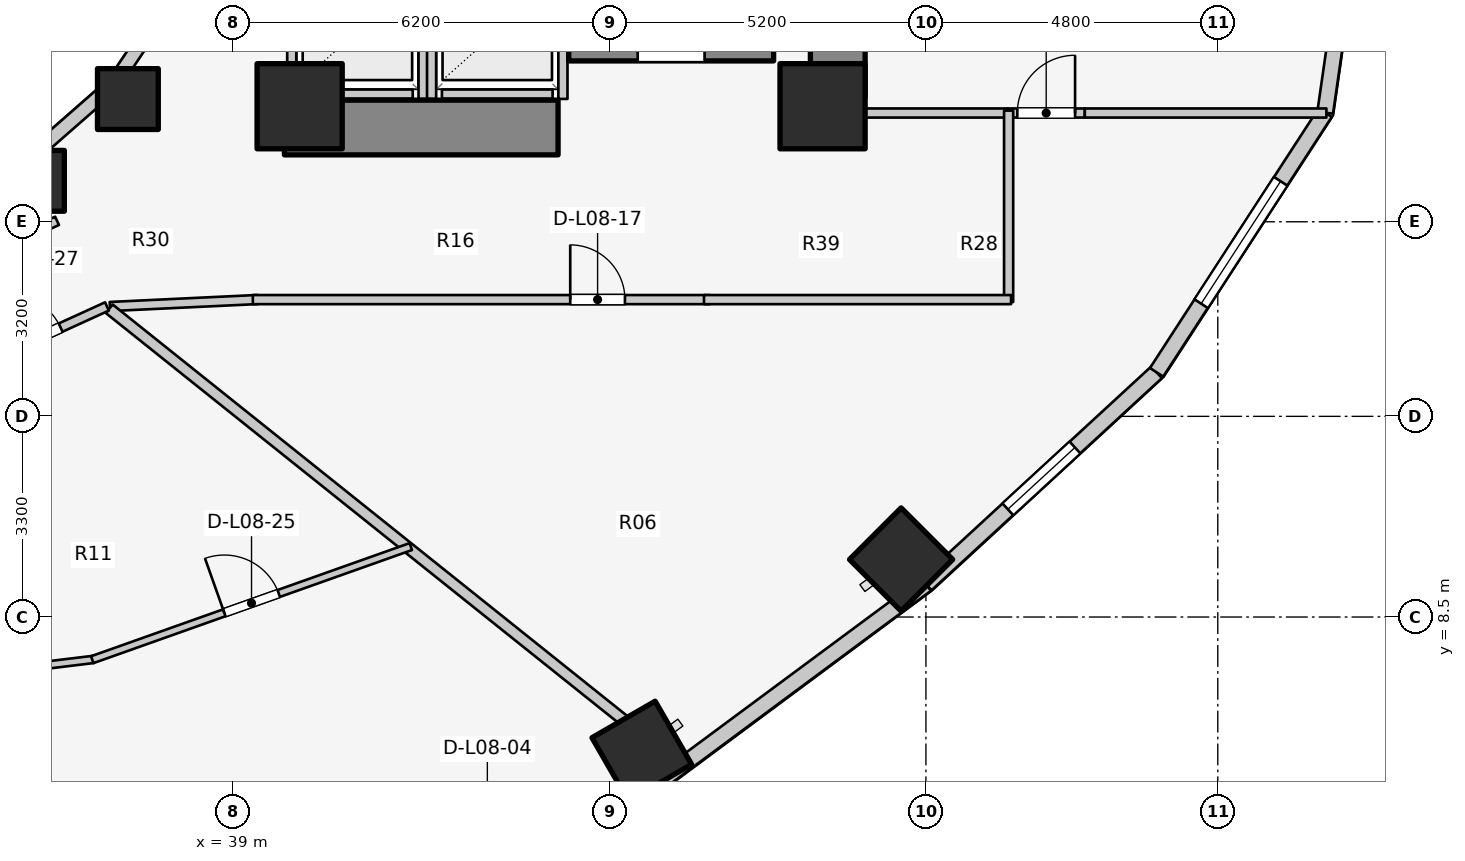
"""IFC4 building model, lengths in metres.
Left out: names, types, materials, properties, quantities, classifications, styles, units other than length and angle.
Written with IfcOpenShell. Run it as: python <this file> out.ifc"""

import sys

from ifc_helpers import new_model, si_unit, direction, frame, frame_2d, origin, origin_2d, place, context, subcontext, project, spatial, rectangle, extrude, element, fill, save


model = new_model("IFC4")
c1 = context("Model", 3, precision=1e-05, world=origin(), true_north=direction((0.0, 1.0)))
c2 = subcontext(c1, "Body", "Model", "MODEL_VIEW")
j1 = project(units=[si_unit("LENGTHUNIT", "METRE"), si_unit("PLANEANGLEUNIT", "RADIAN")], contexts=[c1])
p1 = place(None, origin())
s1 = spatial("IfcSite", under=j1, at=p1, CompositionType="ELEMENT")
p2 = place(p1, origin())
s2 = spatial("IfcBuilding", under=s1, at=p2, CompositionType="ELEMENT")
p3 = place(p2, frame((0.0, 0.0, 30.7)))
s3 = spatial("IfcBuildingStorey", under=s2, at=p3, CompositionType="ELEMENT", Elevation=30.7)
p4 = place(p3, frame((48.95, 17.05, 0.0), z_axis=(0.0, 0.0, 1.0), x_axis=(0.0, 1.0, 0.0)))
e1 = element("IfcWall", 1, at=p4, inside=s3, PredefinedType="SHEAR", context=c2, shape_type="SweptSolid", body=[
    extrude(rectangle(XDim=12.8, YDim=0.9, at=frame_2d((6.4, 0.0))), origin(), (0.0, 0.0, 1.0), 3.1),
])
p5 = place(p3, frame((39.85, 16.55, 0.0), z_axis=(0.0, 0.0, 1.0), x_axis=(1.0, 0.0, 0.0)))
e2 = element("IfcWall", 2, at=p5, inside=s3, PredefinedType="SHEAR", context=c2, shape_type="SweptSolid", body=[
    extrude(rectangle(XDim=4.5, YDim=0.9, at=frame_2d((2.25, 0.0))), origin(), (0.0, 0.0, 1.0), 3.1),
])
p6 = place(p3, frame((44.525, 17.77, 0.0), z_axis=(0.0, 0.0, 1.0), x_axis=(1.0, 0.0, 0.0)))
e3 = element("IfcWall", 3, at=p6, inside=s3, PredefinedType="SOLIDWALL", context=c2, shape_type="SweptSolid", body=[
    extrude(rectangle(XDim=3.37, YDim=0.25, at=frame_2d((1.685, 0.0))), origin(), (0.0, 0.0, 1.0), 3.1),
])
p7 = place(p6, frame((1.135, 0.0, 0.0)))
e4 = element("IfcOpeningElement", 4, at=p7, cuts=e3, PredefinedType="OPENING", context=c2, shape_type="SweptSolid", body=[
    extrude(rectangle(XDim=1.1, YDim=2.1, at=frame_2d((0.55, 1.05))), frame((0.0, 0.135, 0.0), z_axis=(0.0, -1.0, 0.0), x_axis=(1.0, 0.0, 0.0)), (0.0, 0.0, 1.0), 0.27),
])
for number, where, z_axis, x_axis in (
    (5, (40.1, 16.9, 0.0), (0.0, 0.0, 1.0), (1.0, 0.0, 0.0)),
    (6, (48.7, 16.9, 0.0), (0.0, 0.0, 1.0), (1.0, 0.0, 0.0)),
):
    element("IfcColumn", number, at=place(p3, frame(where, z_axis=z_axis, x_axis=x_axis)), inside=s3, PredefinedType="COLUMN", context=c2, shape_type="SweptSolid", body=[
        extrude(rectangle(XDim=1.4, YDim=1.4, at=origin_2d()), origin(), (0.0, 0.0, 1.0), 3.1),
    ])
p8 = place(p3, frame((35.73, 15.673, 0.0), z_axis=(0.0, 0.0, 1.0), x_axis=(1.0, 0.0, 0.0)))
e7 = element("IfcColumn", 7, at=p8, inside=s3, PredefinedType="COLUMN", context=c2, shape_type="SweptSolid", body=[
    extrude(rectangle(XDim=1.0, YDim=1.0, at=origin_2d()), origin(), (0.0, 0.0, 1.0), 3.1),
])
p9 = place(p3, frame((45.727, 6.296, 0.0), z_axis=(0.0, 0.0, 1.0), x_axis=(0.5, -0.866025403784, 0.0)))
e8 = element("IfcColumn", 8, at=p9, inside=s3, PredefinedType="COLUMN", context=c2, shape_type="SweptSolid", body=[
    extrude(rectangle(XDim=1.2, YDim=1.2, at=origin_2d()), origin(), (0.0, 0.0, 1.0), 3.1),
])
p10 = place(p3, frame((37.275, 17.018, 0.0), z_axis=(0.0, 0.0, 1.0), x_axis=(1.0, 0.0, 0.0)))
e9 = element("IfcColumn", 9, at=p10, inside=s3, PredefinedType="COLUMN", context=c2, shape_type="SweptSolid", body=[
    extrude(rectangle(XDim=1.0, YDim=1.0, at=origin_2d()), origin(), (0.0, 0.0, 1.0), 3.1),
])
p11 = place(p3, frame((49.992, 9.446, 0.0), z_axis=(0.0, 0.0, 1.0), x_axis=(0.707106781187, -0.707106781187, 0.0)))
e10 = element("IfcColumn", 10, at=p11, inside=s3, PredefinedType="COLUMN", context=c2, shape_type="SweptSolid", body=[
    extrude(rectangle(XDim=1.2, YDim=1.2, at=origin_2d()), origin(), (0.0, 0.0, 1.0), 3.1),
])
p12 = place(p3, frame((35.56, 15.968, 0.0), z_axis=(0.0, 0.0, 1.0), x_axis=(0.752576694707, 0.658504607869, 0.0)))
e11 = element("IfcWall", 11, at=p12, inside=s3, PredefinedType="STANDARD", context=c2, shape_type="SweptSolid", body=[
    extrude(rectangle(XDim=1.959, YDim=0.23, at=frame_2d((0.98, 0.0))), origin(), (0.0, 0.0, 1.0), 2.16),
])
p13 = place(p3, frame((37.035, 17.258, 0.0), z_axis=(0.0, 0.0, 1.0), x_axis=(0.558197800898, 0.829707909492, 0.0)))
e12 = element("IfcWall", 12, at=p13, inside=s3, PredefinedType="STANDARD", context=c2, shape_type="SweptSolid", body=[
    extrude(rectangle(XDim=2.027, YDim=0.23, at=frame_2d((1.013, 0.0))), origin(), (0.0, 0.0, 1.0), 2.16),
])
p14 = place(p3, frame((40.332, 3.364, 0.0), z_axis=(0.0, 0.0, 1.0), x_axis=(0.919612132394, 0.39282760335, 0.0)))
e13 = element("IfcWall", 13, at=p14, inside=s3, PredefinedType="STANDARD", context=c2, shape_type="SweptSolid", body=[
    extrude(rectangle(XDim=6.209, YDim=0.26, at=frame_2d((3.105, 0.0))), origin(), (0.0, 0.0, 1.0), 2.88),
])
p15 = place(p14, frame((2.505, 0.0, 0.0)))
e14 = element("IfcOpeningElement", 14, at=p15, cuts=e13, PredefinedType="OPENING", context=c2, shape_type="SweptSolid", body=[
    extrude(rectangle(XDim=1.2, YDim=2.2, at=frame_2d((0.6, 1.1))), frame((0.0, 0.14, 0.0), z_axis=(0.0, -1.0, 0.0), x_axis=(1.0, 0.0, 0.0)), (0.0, 0.0, 1.0), 0.28),
])
p16 = place(p3, frame((46.042, 5.803, 0.0), z_axis=(0.0, 0.0, 1.0), x_axis=(0.803477531792, 0.595335078679, 0.0)))
e15 = element("IfcWall", 15, at=p16, inside=s3, PredefinedType="STANDARD", context=c2, shape_type="SweptSolid", body=[
    extrude(rectangle(XDim=5.43, YDim=0.26, at=frame_2d((2.715, 0.0))), origin(), (0.0, 0.0, 1.0), 2.85),
])
p17 = place(p3, frame((50.405, 9.035, 0.0), z_axis=(0.0, 0.0, 1.0), x_axis=(0.735655109293, 0.67735630223, 0.0)))
e16 = element("IfcWall", 16, at=p17, inside=s3, PredefinedType="STANDARD", context=c2, shape_type="SweptSolid", body=[
    extrude(rectangle(XDim=5.151, YDim=0.26, at=frame_2d((2.575, 0.0))), origin(), (0.0, 0.0, 1.0), 2.85),
])
p18 = place(p17, frame((1.825, 0.0, 0.75)))
e17 = element("IfcOpeningElement", 17, at=p18, cuts=e16, PredefinedType="OPENING", context=c2, shape_type="SweptSolid", body=[
    extrude(rectangle(XDim=1.5, YDim=1.6, at=frame_2d((0.75, 0.8))), frame((0.0, 0.14, 0.0), z_axis=(0.0, -1.0, 0.0), x_axis=(1.0, 0.0, 0.0)), (0.0, 0.0, 1.0), 0.28),
])
p19 = place(p3, frame((54.194, 12.524, 0.0), z_axis=(0.0, 0.0, 1.0), x_axis=(0.544578722263, 0.838709732421, 0.0)))
e18 = element("IfcWall", 18, at=p19, inside=s3, PredefinedType="STANDARD", context=c2, shape_type="SweptSolid", body=[
    extrude(rectangle(XDim=5.092, YDim=0.26, at=frame_2d((2.546, 0.0))), origin(), (0.0, 0.0, 1.0), 2.85),
])
p20 = place(p19, frame((1.346, 0.0, 0.75)))
e19 = element("IfcOpeningElement", 19, at=p20, cuts=e18, PredefinedType="OPENING", context=c2, shape_type="SweptSolid", body=[
    extrude(rectangle(XDim=2.4, YDim=1.7, at=frame_2d((1.2, 0.85))), frame((0.0, 0.14, 0.0), z_axis=(0.0, -1.0, 0.0), x_axis=(1.0, 0.0, 0.0)), (0.0, 0.0, 1.0), 0.28),
])
p21 = place(p3, frame((56.967, 16.795, 0.0), z_axis=(0.0, 0.0, 1.0), x_axis=(0.142528001686, 0.989790770181, 0.0)))
e20 = element("IfcWall", 20, at=p21, inside=s3, PredefinedType="STANDARD", context=c2, shape_type="SweptSolid", body=[
    extrude(rectangle(XDim=6.269, YDim=0.26, at=frame_2d((3.135, 0.0))), origin(), (0.0, 0.0, 1.0), 2.85),
])
p22 = place(p21, frame((2.385, 0.0, 0.75)))
e21 = element("IfcOpeningElement", 21, at=p22, cuts=e20, PredefinedType="OPENING", context=c2, shape_type="SweptSolid", body=[
    extrude(rectangle(XDim=1.5, YDim=1.6, at=frame_2d((0.75, 0.8))), frame((0.0, 0.14, 0.0), z_axis=(0.0, -1.0, 0.0), x_axis=(1.0, 0.0, 0.0)), (0.0, 0.0, 1.0), 0.28),
])
p23 = place(p3, frame((40.14, 17.1, 0.0), z_axis=(0.0, 0.0, 1.0), x_axis=(1.0, 0.0, 0.0)))
e22 = element("IfcWall", 22, at=p23, inside=s3, PredefinedType="SOLIDWALL", context=c2, shape_type="SweptSolid", body=[
    extrude(rectangle(XDim=1.82, YDim=0.15, at=frame_2d((0.91, 0.0))), origin(), (0.0, 0.0, 1.0), 2.12),
])
p24 = place(p3, frame((39.97, 17.02, 0.0), z_axis=(0.0, 0.0, 1.0), x_axis=(0.0, 1.0, 0.0)))
e23 = element("IfcWall", 23, at=p24, inside=s3, PredefinedType="SOLIDWALL", context=c2, shape_type="SweptSolid", body=[
    extrude(rectangle(XDim=2.22, YDim=0.15, at=frame_2d((1.11, 0.0))), origin(), (0.0, 0.0, 1.0), 2.12),
])
p25 = place(p3, frame((42.13, 17.02, 0.0), z_axis=(0.0, 0.0, 1.0), x_axis=(0.0, 1.0, 0.0)))
e24 = element("IfcWall", 24, at=p25, inside=s3, PredefinedType="SOLIDWALL", context=c2, shape_type="SweptSolid", body=[
    extrude(rectangle(XDim=2.22, YDim=0.15, at=frame_2d((1.11, 0.0))), origin(), (0.0, 0.0, 1.0), 2.855),
])
p26 = place(p3, frame((42.44, 17.1, 0.0), z_axis=(0.0, 0.0, 1.0), x_axis=(1.0, 0.0, 0.0)))
e25 = element("IfcWall", 25, at=p26, inside=s3, PredefinedType="SOLIDWALL", context=c2, shape_type="SweptSolid", body=[
    extrude(rectangle(XDim=1.82, YDim=0.15, at=frame_2d((0.91, 0.0))), origin(), (0.0, 0.0, 1.0), 2.855),
])
p27 = place(p3, frame((42.27, 17.02, 0.0), z_axis=(0.0, 0.0, 1.0), x_axis=(0.0, 1.0, 0.0)))
e26 = element("IfcWall", 26, at=p27, inside=s3, PredefinedType="SOLIDWALL", context=c2, shape_type="SweptSolid", body=[
    extrude(rectangle(XDim=2.22, YDim=0.15, at=frame_2d((1.11, 0.0))), origin(), (0.0, 0.0, 1.0), 2.855),
])
p28 = place(p3, frame((44.43, 17.02, 0.0), z_axis=(0.0, 0.0, 1.0), x_axis=(0.0, 1.0, 0.0)))
e27 = element("IfcWall", 27, at=p28, inside=s3, PredefinedType="SOLIDWALL", context=c2, shape_type="SweptSolid", body=[
    extrude(rectangle(XDim=2.22, YDim=0.15, at=frame_2d((1.11, 0.0))), origin(), (0.0, 0.0, 1.0), 2.12),
])
p29 = place(p3, frame((34.127, 14.094, 0.0), z_axis=(0.0, 0.0, 1.0), x_axis=(0.906943449489, 0.421252393975, 0.0)))
e28 = element("IfcWall", 28, at=p29, inside=s3, PredefinedType="PARTITIONING", context=c2, shape_type="SweptSolid", body=[
    extrude(rectangle(XDim=2.186, YDim=0.15, at=frame_2d((1.093, 0.0))), origin(), (0.0, 0.0, 1.0), 2.237),
])
p30 = place(p3, frame((48.95, 16.788, 0.0), z_axis=(0.0, 0.0, 1.0), x_axis=(1.0, 0.0, 0.0)))
e29 = element("IfcWall", 29, at=p30, inside=s3, PredefinedType="PARTITIONING", context=c2, shape_type="SweptSolid", body=[
    extrude(rectangle(XDim=2.793, YDim=0.15, at=frame_2d((1.396, 0.0))), origin(), (0.0, 0.0, 1.0), 2.069),
])
p31 = place(p3, frame((51.743, 16.788, 0.0), z_axis=(0.0, 0.0, 1.0), x_axis=(1.0, 0.0, 0.0)))
e30 = element("IfcWall", 30, at=p31, inside=s3, PredefinedType="PARTITIONING", context=c2, shape_type="SweptSolid", body=[
    extrude(rectangle(XDim=1.27, YDim=0.15, at=frame_2d((0.635, 0.0))), origin(), (0.0, 0.0, 1.0), 2.855),
])
p32 = place(p31, frame((0.16, 0.0, 0.0)))
e31 = element("IfcOpeningElement", 31, at=p32, cuts=e30, PredefinedType="OPENING", context=c2, shape_type="SweptSolid", body=[
    extrude(rectangle(XDim=0.95, YDim=2.1, at=frame_2d((0.475, 1.05))), frame((0.0, 0.085, 0.0), z_axis=(0.0, -1.0, 0.0), x_axis=(1.0, 0.0, 0.0)), (0.0, 0.0, 1.0), 0.17),
])
p33 = place(p3, frame((53.013, 16.788, 0.0), z_axis=(0.0, 0.0, 1.0), x_axis=(1.0, 0.0, 0.0)))
e32 = element("IfcWall", 32, at=p33, inside=s3, PredefinedType="PARTITIONING", context=c2, shape_type="SweptSolid", body=[
    extrude(rectangle(XDim=3.973, YDim=0.15, at=frame_2d((1.987, 0.0))), origin(), (0.0, 0.0, 1.0), 2.855),
])
p34 = place(p3, frame((51.76, 13.68, 0.0), z_axis=(0.0, 0.0, 1.0), x_axis=(0.0, 1.0, 0.0)))
e33 = element("IfcWall", 33, at=p34, inside=s3, PredefinedType="PARTITIONING", context=c2, shape_type="SweptSolid", body=[
    extrude(rectangle(XDim=3.148, YDim=0.15, at=frame_2d((1.574, 0.0))), origin(), (0.0, 0.0, 1.0), 2.855),
])
p35 = place(p3, frame((36.98, 13.606, 0.0), z_axis=(0.0, 0.0, 1.0), x_axis=(0.998877427952, 0.047369651964, 0.0)))
e34 = element("IfcWall", 34, at=p35, inside=s3, PredefinedType="PARTITIONING", context=c2, shape_type="SweptSolid", body=[
    extrude(rectangle(XDim=2.433, YDim=0.15, at=frame_2d((1.216, 0.0))), origin(), (0.0, 0.0, 1.0), 2.237),
])
p36 = place(p3, frame((39.33, 13.72, 0.0), z_axis=(0.0, 0.0, 1.0), x_axis=(1.0, 0.0, 0.0)))
e35 = element("IfcWall", 35, at=p36, inside=s3, PredefinedType="PARTITIONING", context=c2, shape_type="SweptSolid", body=[
    extrude(rectangle(XDim=7.52, YDim=0.15, at=frame_2d((3.76, 0.0))), origin(), (0.0, 0.0, 1.0), 2.237),
])
p37 = place(p36, frame((5.22, 0.0, 0.0)))
e36 = element("IfcOpeningElement", 36, at=p37, cuts=e35, PredefinedType="OPENING", context=c2, shape_type="SweptSolid", body=[
    extrude(rectangle(XDim=0.9, YDim=2.1, at=frame_2d((0.45, 1.05))), frame((0.0, 0.085, 0.0), z_axis=(0.0, -1.0, 0.0), x_axis=(1.0, 0.0, 0.0)), (0.0, 0.0, 1.0), 0.17),
])
p38 = place(p3, frame((46.75, 13.72, 0.0), z_axis=(0.0, 0.0, 1.0), x_axis=(1.0, 0.0, 0.0)))
e37 = element("IfcWall", 37, at=p38, inside=s3, PredefinedType="PARTITIONING", context=c2, shape_type="SweptSolid", body=[
    extrude(rectangle(XDim=5.05, YDim=0.15, at=frame_2d((2.525, 0.0))), origin(), (0.0, 0.0, 1.0), 2.069),
])
p39 = place(p3, frame((36.968, 13.569, 0.0), z_axis=(0.0, 0.0, 1.0), x_axis=(0.781055486744, -0.624461629428, 0.0)))
e38 = element("IfcWall", 38, at=p39, inside=s3, PredefinedType="PARTITIONING", context=c2, shape_type="SweptSolid", body=[
    extrude(rectangle(XDim=10.843, YDim=0.18, at=frame_2d((5.422, 0.0))), origin(), (0.0, 0.0, 1.0), 2.237),
])
p40 = place(p3, frame((31.95, 7.225, 0.0), z_axis=(0.0, 0.0, 1.0), x_axis=(0.992699076447, 0.120617343785, 0.0)))
e39 = element("IfcWall", 39, at=p40, inside=s3, PredefinedType="MOVABLE", context=c2, shape_type="SweptSolid", body=[
    extrude(rectangle(XDim=4.793, YDim=0.12, at=frame_2d((2.396, 0.0))), origin(), (0.0, 0.0, 1.0), 2.237),
])
p41 = place(p3, frame((36.689, 7.798, 0.0), z_axis=(0.0, 0.0, 1.0), x_axis=(0.942369240096, 0.334574678243, 0.0)))
e40 = element("IfcWall", 40, at=p41, inside=s3, PredefinedType="MOVABLE", context=c2, shape_type="SweptSolid", body=[
    extrude(rectangle(XDim=5.559, YDim=0.12, at=frame_2d((2.779, 0.0))), origin(), (0.0, 0.0, 1.0), 2.237),
])
p42 = place(p41, frame((2.304, 0.0, 0.0)))
e41 = element("IfcOpeningElement", 41, at=p42, cuts=e40, PredefinedType="OPENING", context=c2, shape_type="SweptSolid", body=[
    extrude(rectangle(XDim=0.95, YDim=2.1, at=frame_2d((0.475, 1.05))), frame((0.0, 0.07, 0.0), z_axis=(0.0, -1.0, 0.0), x_axis=(1.0, 0.0, 0.0)), (0.0, 0.0, 1.0), 0.14),
])
p43 = place(p3, frame((34.543, 12.518, 0.0), z_axis=(0.0, 0.0, 1.0), x_axis=(0.909747571199, 0.415161843982, 0.0)))
e42 = element("IfcWall", 42, at=p43, inside=s3, PredefinedType="PARTITIONING", context=c2, shape_type="SweptSolid", body=[
    extrude(rectangle(XDim=2.625, YDim=0.15, at=frame_2d((1.312, 0.0))), origin(), (0.0, 0.0, 1.0), 2.237),
])
p44 = place(p43, frame((0.838, 0.0, 0.0)))
e43 = element("IfcOpeningElement", 43, at=p44, cuts=e42, PredefinedType="OPENING", context=c2, shape_type="SweptSolid", body=[
    extrude(rectangle(XDim=0.95, YDim=2.1, at=frame_2d((0.475, 1.05))), frame((0.0, 0.085, 0.0), z_axis=(0.0, -1.0, 0.0), x_axis=(1.0, 0.0, 0.0)), (0.0, 0.0, 1.0), 0.17),
])
p45 = place(p18, origin())
e44 = element("IfcWindow", 44, at=p45, inside=s3, PartitioningType="SINGLE_PANEL", PredefinedType="WINDOW", context=c2, shape_type="SweptSolid", body=[
    extrude(rectangle(XDim=1.5, YDim=1.6, at=frame_2d((0.75, 0.8))), frame((0.0, 0.03, 0.0), z_axis=(0.0, -1.0, 0.0), x_axis=(1.0, 0.0, 0.0)), (0.0, 0.0, 1.0), 0.06),
])
fill(e17, e44)
p46 = place(p20, origin())
e45 = element("IfcWindow", 45, at=p46, inside=s3, PartitioningType="SINGLE_PANEL", PredefinedType="WINDOW", context=c2, shape_type="SweptSolid", body=[
    extrude(rectangle(XDim=2.4, YDim=1.7, at=frame_2d((1.2, 0.85))), frame((0.0, 0.03, 0.0), z_axis=(0.0, -1.0, 0.0), x_axis=(1.0, 0.0, 0.0)), (0.0, 0.0, 1.0), 0.06),
])
fill(e19, e45)
p47 = place(p7, origin())
e46 = element("IfcDoor", 46, at=p47, inside=s3, OperationType="SINGLE_SWING_LEFT", PredefinedType="DOOR", context=c2, shape_type="SweptSolid", body=[
    extrude(rectangle(XDim=1.1, YDim=2.1, at=frame_2d((0.55, 1.05))), frame((0.0, 0.025, 0.0), z_axis=(0.0, -1.0, 0.0), x_axis=(1.0, 0.0, 0.0)), (0.0, 0.0, 1.0), 0.05),
])
fill(e4, e46)
p48 = place(p32, origin())
e47 = element("IfcDoor", 47, at=p48, inside=s3, OperationType="SINGLE_SWING_RIGHT", PredefinedType="DOOR", context=c2, shape_type="SweptSolid", body=[
    extrude(rectangle(XDim=0.95, YDim=2.1, at=frame_2d((0.475, 1.05))), frame((0.0, 0.025, 0.0), z_axis=(0.0, -1.0, 0.0), x_axis=(1.0, 0.0, 0.0)), (0.0, 0.0, 1.0), 0.05),
])
fill(e31, e47)
p49 = place(p37, origin())
e48 = element("IfcDoor", 48, at=p49, inside=s3, OperationType="SINGLE_SWING_LEFT", PredefinedType="DOOR", context=c2, shape_type="SweptSolid", body=[
    extrude(rectangle(XDim=0.9, YDim=2.1, at=frame_2d((0.45, 1.05))), frame((0.0, 0.025, 0.0), z_axis=(0.0, -1.0, 0.0), x_axis=(1.0, 0.0, 0.0)), (0.0, 0.0, 1.0), 0.05),
])
fill(e36, e48)
p50 = place(p42, origin())
e49 = element("IfcDoor", 49, at=p50, inside=s3, OperationType="SINGLE_SWING_LEFT", PredefinedType="DOOR", context=c2, shape_type="SweptSolid", body=[
    extrude(rectangle(XDim=0.95, YDim=2.1, at=frame_2d((0.475, 1.05))), frame((0.0, 0.025, 0.0), z_axis=(0.0, -1.0, 0.0), x_axis=(1.0, 0.0, 0.0)), (0.0, 0.0, 1.0), 0.05),
])
fill(e41, e49)
p51 = place(p44, origin())
e50 = element("IfcDoor", 50, at=p51, inside=s3, OperationType="SINGLE_SWING_LEFT", PredefinedType="DOOR", context=c2, shape_type="SweptSolid", body=[
    extrude(rectangle(XDim=0.95, YDim=2.1, at=frame_2d((0.475, 1.05))), frame((0.0, 0.025, 0.0), z_axis=(0.0, -1.0, 0.0), x_axis=(1.0, 0.0, 0.0)), (0.0, 0.0, 1.0), 0.05),
])
fill(e43, e50)
save(model, sys.argv[1])
